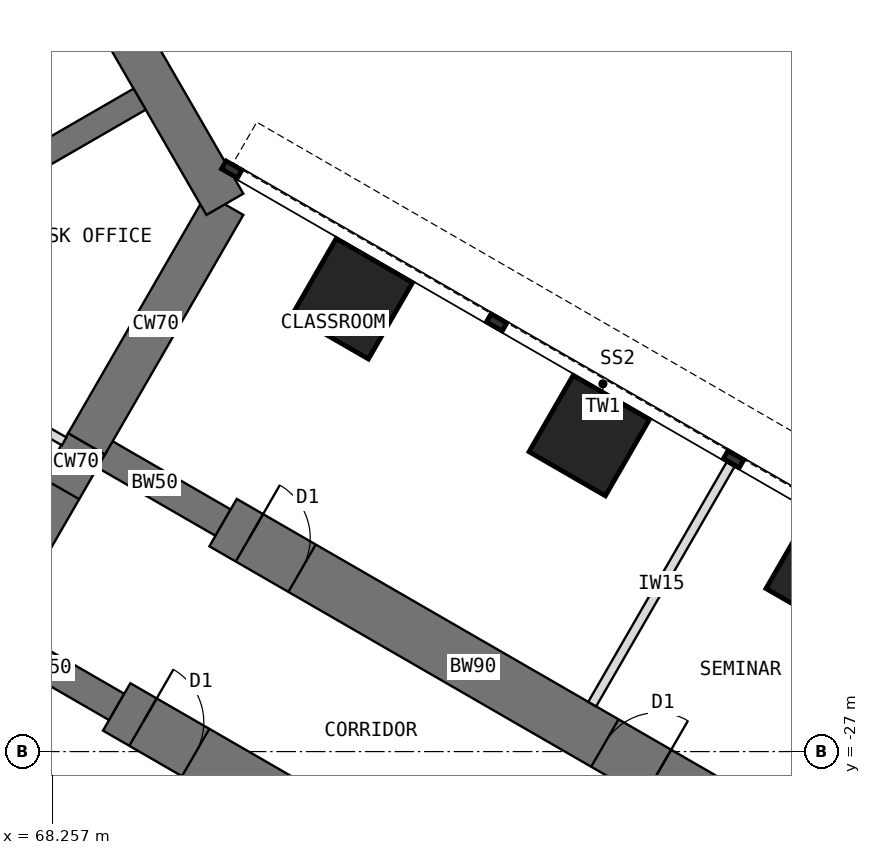
"""IFC4 building model, lengths in metres.
Left out: names, types, materials, properties, quantities, classifications, styles, units other than length and angle.
Written with IfcOpenShell. Run it as: python <this file> out.ifc"""

import sys

from ifc_helpers import new_model, si_unit, direction, frame, frame_2d, origin, origin_2d, place, context, subcontext, project, spatial, rectangle, extrude, element, fill, save


model = new_model("IFC4")
c1 = context("Model", 3, precision=1e-05, world=origin(), true_north=direction((0.0, 1.0)))
c2 = subcontext(c1, "Body", "Model", "MODEL_VIEW")
j1 = project(units=[si_unit("LENGTHUNIT", "METRE"), si_unit("PLANEANGLEUNIT", "RADIAN")], contexts=[c1])
p1 = place(None, origin())
s1 = spatial("IfcSite", under=j1, at=p1, CompositionType="ELEMENT")
p2 = place(p1, origin())
s2 = spatial("IfcBuilding", under=s1, at=p2, CompositionType="ELEMENT")
p3 = place(p2, frame((0.0, 0.0, 52.5)))
s3 = spatial("IfcBuildingStorey", under=s2, at=p3, CompositionType="ELEMENT", Elevation=52.5)
p4 = place(p3, frame((67.072, -24.97, 0.0), z_axis=(0.0, 0.0, 1.0), x_axis=(0.500010275428, 0.866019471182, 0.0)))
e1 = element("IfcWall", 1, at=p4, inside=s3, PredefinedType="SHEAR", context=c2, shape_type="SweptSolid", body=[
    extrude(rectangle(XDim=3.5, YDim=0.7, at=frame_2d((1.75, 0.0))), origin(), (0.0, 0.0, 1.0), 4.0),
])
p5 = place(p4, frame((0.85, 0.0, 0.0)))
e2 = element("IfcOpeningElement", 2, at=p5, cuts=e1, PredefinedType="OPENING", context=c2, shape_type="SweptSolid", body=[
    extrude(rectangle(XDim=1.8, YDim=2.1, at=frame_2d((0.9, 1.05))), frame((0.0, 0.36, 0.0), z_axis=(0.0, -1.0, 0.0), x_axis=(1.0, 0.0, 0.0)), (0.0, 0.0, 1.0), 0.72),
])
p6 = place(p3, frame((68.822, -21.939, 0.0), z_axis=(0.0, 0.0, 1.0), x_axis=(0.500024481964, 0.866011268655, 0.0)))
e3 = element("IfcWall", 3, at=p6, inside=s3, PredefinedType="SHEAR", context=c2, shape_type="SweptSolid", body=[
    extrude(rectangle(XDim=4.548, YDim=0.7, at=frame_2d((2.274, 0.0))), origin(), (0.0, 0.0, 1.0), 4.0),
])
p7 = place(p3, frame((71.096, -18.0, 0.0), z_axis=(0.0, 0.0, 1.0), x_axis=(-0.500005998175, 0.866021940709, 0.0)))
e4 = element("IfcWall", 4, at=p7, inside=s3, PredefinedType="SHEAR", context=c2, shape_type="SweptSolid", body=[
    extrude(rectangle(XDim=12.596, YDim=0.7, at=frame_2d((6.298, 0.0))), origin(), (0.0, 0.0, 1.0), 4.0),
])
p8 = place(p3, frame((68.822, -21.939, 0.0), z_axis=(0.0, 0.0, 1.0), x_axis=(0.866072649678, -0.499918158782, 0.0)))
e5 = element("IfcWall", 5, at=p8, inside=s3, PredefinedType="SHEAR", context=c2, shape_type="SweptSolid", body=[
    extrude(rectangle(XDim=2.592, YDim=0.5, at=frame_2d((1.296, 0.0))), origin(), (0.0, 0.0, 1.0), 4.0),
])
p9 = place(p3, frame((71.066, -23.234, 0.0), z_axis=(0.0, 0.0, 1.0), x_axis=(0.86602681393, -0.499997557548, 0.0)))
e6 = element("IfcWall", 6, at=p9, inside=s3, PredefinedType="SHEAR", context=c2, shape_type="SweptSolid", body=[
    extrude(rectangle(XDim=9.5, YDim=0.9, at=frame_2d((4.75, 0.0))), origin(), (0.0, 0.0, 1.0), 4.0),
])
p10 = place(p9, frame((0.5, 0.0, 0.0)))
e7 = element("IfcOpeningElement", 7, at=p10, cuts=e6, PredefinedType="OPENING", context=c2, shape_type="SweptSolid", body=[
    extrude(rectangle(XDim=1.0, YDim=2.1, at=frame_2d((0.5, 1.05))), frame((0.0, 0.46, 0.0), z_axis=(0.0, -1.0, 0.0), x_axis=(1.0, 0.0, 0.0)), (0.0, 0.0, 1.0), 0.92),
])
p11 = place(p9, frame((7.25, 0.0, 0.0)))
e8 = element("IfcOpeningElement", 8, at=p11, cuts=e6, PredefinedType="OPENING", context=c2, shape_type="SweptSolid", body=[
    extrude(rectangle(XDim=1.0, YDim=2.1, at=frame_2d((0.5, 1.05))), frame((0.0, 0.46, 0.0), z_axis=(0.0, -1.0, 0.0), x_axis=(1.0, 0.0, 0.0)), (0.0, 0.0, 1.0), 0.92),
])
p12 = place(p3, frame((67.072, -24.97, 0.0), z_axis=(0.0, 0.0, 1.0), x_axis=(0.866031863473, -0.499988811324, 0.0)))
e9 = element("IfcWall", 9, at=p12, inside=s3, PredefinedType="SHEAR", context=c2, shape_type="SweptSolid", body=[
    extrude(rectangle(XDim=2.592, YDim=0.5, at=frame_2d((1.296, 0.0))), origin(), (0.0, 0.0, 1.0), 4.0),
])
p13 = place(p3, frame((69.316, -26.266, 0.0), z_axis=(0.0, 0.0, 1.0), x_axis=(0.86602681393, -0.499997557548, 0.0)))
e10 = element("IfcWall", 10, at=p13, inside=s3, PredefinedType="SHEAR", context=c2, shape_type="SweptSolid", body=[
    extrude(rectangle(XDim=9.5, YDim=0.9, at=frame_2d((4.75, 0.0))), origin(), (0.0, 0.0, 1.0), 4.0),
])
p14 = place(p13, frame((0.5, 0.0, 0.0)))
e11 = element("IfcOpeningElement", 11, at=p14, cuts=e10, PredefinedType="OPENING", context=c2, shape_type="SweptSolid", body=[
    extrude(rectangle(XDim=1.0, YDim=2.1, at=frame_2d((0.5, 1.05))), frame((0.0, 0.46, 0.0), z_axis=(0.0, -1.0, 0.0), x_axis=(1.0, 0.0, 0.0)), (0.0, 0.0, 1.0), 0.92),
])
p15 = place(p13, frame((7.25, 0.0, 0.0)))
e12 = element("IfcOpeningElement", 12, at=p15, cuts=e10, PredefinedType="OPENING", context=c2, shape_type="SweptSolid", body=[
    extrude(rectangle(XDim=1.0, YDim=2.1, at=frame_2d((0.5, 1.05))), frame((0.0, 0.46, 0.0), z_axis=(0.0, -1.0, 0.0), x_axis=(1.0, 0.0, 0.0)), (0.0, 0.0, 1.0), 0.92),
])
for number, where, z_axis, x_axis in (
    (13, (73.191, -19.554, 0.0), (0.0, 0.0, 1.0), (0.5, 0.866, 0.0)),
    (14, (77.088, -21.804, 0.0), (0.0, 0.0, 1.0), (0.5, 0.866, 0.0)),
    (15, (80.986, -24.054, 0.0), (0.0, 0.0, 1.0), (0.5, 0.866, 0.0)),
):
    element("IfcColumn", number, at=place(p3, frame(where, z_axis=z_axis, x_axis=x_axis)), inside=s3, PredefinedType="COLUMN", context=c2, shape_type="SweptSolid", body=[
        extrude(rectangle(XDim=1.45, YDim=1.45, at=origin_2d()), origin(), (0.0, 0.0, 1.0), 4.0),
    ])
p16 = place(p3, frame((64.62, -19.201, 0.0), z_axis=(0.0, 0.0, 1.0), x_axis=(0.866023886965, 0.500002627198, 0.0)))
e16 = element("IfcWall", 16, at=p16, inside=s3, PredefinedType="SHEAR", context=c2, shape_type="SweptSolid", body=[
    extrude(rectangle(XDim=5.858, YDim=0.4, at=frame_2d((2.929, 0.0))), origin(), (0.0, 0.0, 1.0), 4.0),
])
p17 = place(p3, frame((77.137, -26.22, 0.0), z_axis=(0.0, 0.0, 1.0), x_axis=(0.500022803284, 0.866012237902, 0.0)))
e17 = element("IfcWall", 17, at=p17, inside=s3, PredefinedType="PARTITIONING", context=c2, shape_type="SweptSolid", body=[
    extrude(rectangle(XDim=4.55, YDim=0.15, at=frame_2d((2.275, 0.0))), origin(), (0.0, 0.0, 1.0), 3.8),
])
p18 = place(p3, frame((64.583, -19.664, 0.0), z_axis=(0.0, 0.0, 1.0), x_axis=(0.866025445582, -0.499999927604, 0.0)))
e18 = element("IfcWall", 18, at=p18, inside=s3, PredefinedType="PARTITIONING", context=c2, shape_type="SweptSolid", body=[
    extrude(rectangle(XDim=4.468, YDim=0.15, at=frame_2d((2.234, 0.0))), origin(), (0.0, 0.0, 1.0), 3.8),
])
p19 = place(p18, frame((1.744, 0.0, 0.0)))
e19 = element("IfcOpeningElement", 19, at=p19, cuts=e18, PredefinedType="OPENING", context=c2, shape_type="SweptSolid", body=[
    extrude(rectangle(XDim=1.0, YDim=2.1, at=frame_2d((0.5, 1.05))), frame((0.0, 0.085, 0.0), z_axis=(0.0, -1.0, 0.0), x_axis=(1.0, 0.0, 0.0)), (0.0, 0.0, 1.0), 0.17),
])
p20 = place(p5, origin())
e20 = element("IfcDoor", 20, at=p20, inside=s3, OperationType="DOUBLE_DOOR_DOUBLE_SWING", PredefinedType="DOOR", context=c2, shape_type="SweptSolid", body=[
    extrude(rectangle(XDim=1.72, YDim=2.06, at=frame_2d((0.9, 1.03))), frame((0.0, 0.025, 0.0), z_axis=(0.0, -1.0, 0.0), x_axis=(1.0, 0.0, 0.0)), (0.0, 0.0, 1.0), 0.05),
    extrude(rectangle(XDim=0.04, YDim=2.1, at=frame_2d((0.02, 1.05))), frame((0.0, 0.35, 0.0), z_axis=(0.0, -1.0, 0.0), x_axis=(1.0, 0.0, 0.0)), (0.0, 0.0, 1.0), 0.699),
    extrude(rectangle(XDim=0.04, YDim=2.1, at=frame_2d((1.78, 1.05))), frame((0.0, 0.35, 0.0), z_axis=(0.0, -1.0, 0.0), x_axis=(1.0, 0.0, 0.0)), (0.0, 0.0, 1.0), 0.699),
    extrude(rectangle(XDim=1.72, YDim=0.04, at=frame_2d((0.9, 2.08))), frame((0.0, 0.35, 0.0), z_axis=(0.0, -1.0, 0.0), x_axis=(1.0, 0.0, 0.0)), (0.0, 0.0, 1.0), 0.699),
])
fill(e2, e20)
p21 = place(p10, origin())
e21 = element("IfcDoor", 21, at=p21, inside=s3, OperationType="SINGLE_SWING_LEFT", PredefinedType="DOOR", context=c2, shape_type="SweptSolid", body=[
    extrude(rectangle(XDim=0.92, YDim=2.06, at=frame_2d((0.5, 1.03))), frame((0.0, 0.025, 0.0), z_axis=(0.0, -1.0, 0.0), x_axis=(1.0, 0.0, 0.0)), (0.0, 0.0, 1.0), 0.05),
    extrude(rectangle(XDim=0.04, YDim=2.1, at=frame_2d((0.02, 1.05))), frame((0.0, 0.45, 0.0), z_axis=(0.0, -1.0, 0.0), x_axis=(1.0, 0.0, 0.0)), (0.0, 0.0, 1.0), 0.899),
    extrude(rectangle(XDim=0.04, YDim=2.1, at=frame_2d((0.98, 1.05))), frame((0.0, 0.45, 0.0), z_axis=(0.0, -1.0, 0.0), x_axis=(1.0, 0.0, 0.0)), (0.0, 0.0, 1.0), 0.899),
    extrude(rectangle(XDim=0.92, YDim=0.04, at=frame_2d((0.5, 2.08))), frame((0.0, 0.45, 0.0), z_axis=(0.0, -1.0, 0.0), x_axis=(1.0, 0.0, 0.0)), (0.0, 0.0, 1.0), 0.899),
])
fill(e7, e21)
p22 = place(p11, origin())
e22 = element("IfcDoor", 22, at=p22, inside=s3, OperationType="SINGLE_SWING_RIGHT", PredefinedType="DOOR", context=c2, shape_type="SweptSolid", body=[
    extrude(rectangle(XDim=0.92, YDim=2.06, at=frame_2d((0.5, 1.03))), frame((0.0, 0.025, 0.0), z_axis=(0.0, -1.0, 0.0), x_axis=(1.0, 0.0, 0.0)), (0.0, 0.0, 1.0), 0.05),
    extrude(rectangle(XDim=0.04, YDim=2.1, at=frame_2d((0.02, 1.05))), frame((0.0, 0.45, 0.0), z_axis=(0.0, -1.0, 0.0), x_axis=(1.0, 0.0, 0.0)), (0.0, 0.0, 1.0), 0.899),
    extrude(rectangle(XDim=0.04, YDim=2.1, at=frame_2d((0.98, 1.05))), frame((0.0, 0.45, 0.0), z_axis=(0.0, -1.0, 0.0), x_axis=(1.0, 0.0, 0.0)), (0.0, 0.0, 1.0), 0.899),
    extrude(rectangle(XDim=0.92, YDim=0.04, at=frame_2d((0.5, 2.08))), frame((0.0, 0.45, 0.0), z_axis=(0.0, -1.0, 0.0), x_axis=(1.0, 0.0, 0.0)), (0.0, 0.0, 1.0), 0.899),
])
fill(e8, e22)
p23 = place(p14, origin())
e23 = element("IfcDoor", 23, at=p23, inside=s3, OperationType="SINGLE_SWING_LEFT", PredefinedType="DOOR", context=c2, shape_type="SweptSolid", body=[
    extrude(rectangle(XDim=0.92, YDim=2.06, at=frame_2d((0.5, 1.03))), frame((0.0, 0.025, 0.0), z_axis=(0.0, -1.0, 0.0), x_axis=(1.0, 0.0, 0.0)), (0.0, 0.0, 1.0), 0.05),
    extrude(rectangle(XDim=0.04, YDim=2.1, at=frame_2d((0.02, 1.05))), frame((0.0, 0.45, 0.0), z_axis=(0.0, -1.0, 0.0), x_axis=(1.0, 0.0, 0.0)), (0.0, 0.0, 1.0), 0.899),
    extrude(rectangle(XDim=0.04, YDim=2.1, at=frame_2d((0.98, 1.05))), frame((0.0, 0.45, 0.0), z_axis=(0.0, -1.0, 0.0), x_axis=(1.0, 0.0, 0.0)), (0.0, 0.0, 1.0), 0.899),
    extrude(rectangle(XDim=0.92, YDim=0.04, at=frame_2d((0.5, 2.08))), frame((0.0, 0.45, 0.0), z_axis=(0.0, -1.0, 0.0), x_axis=(1.0, 0.0, 0.0)), (0.0, 0.0, 1.0), 0.899),
])
fill(e11, e23)
save(model, sys.argv[1])
